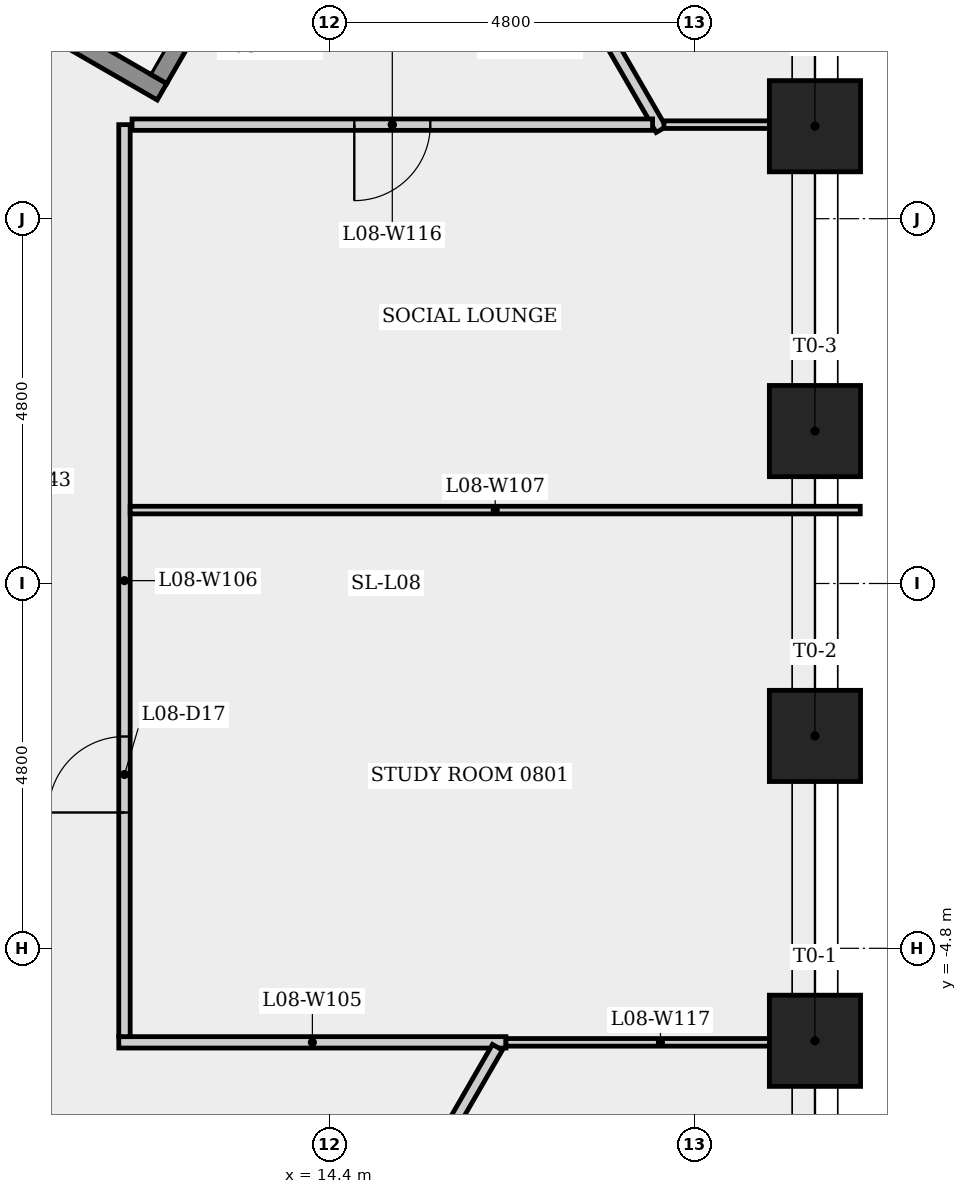
"""IFC4 building model, lengths in metres.
Left out: names, types, materials, properties, quantities, classifications, styles, units other than length and angle.
Written with IfcOpenShell. Run it as: python <this file> out.ifc"""

import sys

from ifc_helpers import new_model, si_unit, direction, frame, frame_2d, origin, origin_2d, place, context, subcontext, project, spatial, rectangle, extrude, element, fill, save


model = new_model("IFC4")
c1 = context("Model", 3, precision=1e-05, world=origin(), true_north=direction((0.0, 1.0)))
c2 = subcontext(c1, "Body", "Model", "MODEL_VIEW")
j1 = project(units=[si_unit("LENGTHUNIT", "METRE"), si_unit("PLANEANGLEUNIT", "RADIAN")], contexts=[c1])
p1 = place(None, origin())
s1 = spatial("IfcSite", under=j1, at=p1, CompositionType="ELEMENT")
p2 = place(p1, origin())
s2 = spatial("IfcBuilding", under=s1, at=p2, CompositionType="ELEMENT")
p3 = place(p2, frame((0.0, 0.0, 35.7)))
s3 = spatial("IfcBuildingStorey", under=s2, at=p3, CompositionType="ELEMENT", Elevation=35.7)
for number, where, z_axis, x_axis in (
    (1, (20.785, -6.017, 0.0), (0.0, 0.0, 1.0), (1.0, 0.0, 0.0)),
    (2, (20.785, -2.006, 0.0), (0.0, 0.0, 1.0), (1.0, 0.0, 0.0)),
    (3, (20.785, 2.006, 0.0), (0.0, 0.0, 1.0), (1.0, 0.0, 0.0)),
    (4, (20.785, 6.017, 0.0), (0.0, 0.0, 1.0), (1.0, 0.0, 0.0)),
):
    element("IfcColumn", number, at=place(p3, frame(where, z_axis=z_axis, x_axis=x_axis)), inside=s3, PredefinedType="COLUMN", context=c2, shape_type="SweptSolid", body=[
        extrude(rectangle(XDim=1.2, YDim=1.2, at=origin_2d()), origin(), (0.0, 0.0, 1.0), 3.4),
    ])
p4 = place(p3, frame((11.625, -6.037, 0.0), z_axis=(0.0, 0.0, 1.0), x_axis=(1.0, 0.0, 0.0)))
e5 = element("IfcWall", 5, at=p4, inside=s3, PredefinedType="PARTITIONING", context=c2, shape_type="SweptSolid", body=[
    extrude(rectangle(XDim=5.094, YDim=0.15, at=frame_2d((2.547, 0.0))), origin(), (0.0, 0.0, 1.0), 3.05),
])
p5 = place(p3, frame((11.7, -5.962, 0.0), z_axis=(0.0, 0.0, 1.0), x_axis=(0.0, 1.0, 0.0)))
e6 = element("IfcWall", 6, at=p5, inside=s3, PredefinedType="PARTITIONING", context=c2, shape_type="SweptSolid", body=[
    extrude(rectangle(XDim=12.0, YDim=0.15, at=frame_2d((6.0, 0.0))), origin(), (0.0, 0.0, 1.0), 3.05),
])
p6 = place(p5, frame((2.949, 0.0, 0.0)))
e7 = element("IfcOpeningElement", 7, at=p6, cuts=e6, PredefinedType="OPENING", context=c2, shape_type="SweptSolid", body=[
    extrude(rectangle(XDim=1.0, YDim=2.1, at=frame_2d((0.5, 1.05))), frame((0.0, 0.085, 0.0), z_axis=(0.0, -1.0, 0.0), x_axis=(1.0, 0.0, 0.0)), (0.0, 0.0, 1.0), 0.17),
])
p7 = place(p3, frame((11.775, 0.966, 0.0), z_axis=(0.0, 0.0, 1.0), x_axis=(1.0, 0.0, 0.0)))
e8 = element("IfcWall", 8, at=p7, inside=s3, PredefinedType="PARTITIONING", context=c2, shape_type="SweptSolid", body=[
    extrude(rectangle(XDim=9.606, YDim=0.1, at=frame_2d((4.803, 0.0))), origin(), (0.0, 0.0, 1.0), 3.05),
])
p8 = place(p3, frame((12.194, 6.47, 0.0), z_axis=(0.0, 0.0, 1.0), x_axis=(-0.866025499775, 0.499999833739, 0.0)))
e9 = element("IfcWall", 9, at=p8, inside=s3, PredefinedType="SHEAR", context=c2, shape_type="SweptSolid", body=[
    extrude(rectangle(XDim=6.4, YDim=0.25, at=frame_2d((3.2, 0.0))), origin(), (0.0, 0.0, 1.0), 3.05),
])
p9 = place(p8, frame((5.25, 0.0, 0.0)))
e10 = element("IfcOpeningElement", 10, at=p9, cuts=e9, PredefinedType="OPENING", context=c2, shape_type="SweptSolid", body=[
    extrude(rectangle(XDim=1.0, YDim=2.1, at=frame_2d((0.5, 1.05))), frame((0.0, 0.135, 0.0), z_axis=(0.0, -1.0, 0.0), x_axis=(1.0, 0.0, 0.0)), (0.0, 0.0, 1.0), 0.27),
])
p10 = place(p3, frame((13.523, 9.022, 0.0), z_axis=(0.0, 0.0, 1.0), x_axis=(-0.500034990121, -0.866005201286, 0.0)))
e11 = element("IfcWall", 11, at=p10, inside=s3, PredefinedType="SHEAR", context=c2, shape_type="SweptSolid", body=[
    extrude(rectangle(XDim=2.75, YDim=0.25, at=frame_2d((1.375, 0.0))), origin(), (0.0, 0.0, 1.0), 3.05),
])
p11 = place(p3, frame((15.299, 11.968, 0.0), z_axis=(0.0, 0.0, 1.0), x_axis=(0.499996158224, -0.866027621823, 0.0)))
e12 = element("IfcWall", 12, at=p11, inside=s3, PredefinedType="PARTITIONING", context=c2, shape_type="SweptSolid", body=[
    extrude(rectangle(XDim=6.923, YDim=0.15, at=frame_2d((3.462, 0.0))), origin(), (0.0, 0.0, 1.0), 3.05),
])
p12 = place(p11, frame((2.907, 0.0, 0.0)))
e13 = element("IfcOpeningElement", 13, at=p12, cuts=e12, PredefinedType="OPENING", context=c2, shape_type="SweptSolid", body=[
    extrude(rectangle(XDim=1.0, YDim=2.1, at=frame_2d((0.5, 1.05))), frame((0.0, 0.085, 0.0), z_axis=(0.0, -1.0, 0.0), x_axis=(1.0, 0.0, 0.0)), (0.0, 0.0, 1.0), 0.17),
])
p13 = place(p3, frame((16.607, -6.102, 0.0), z_axis=(0.0, 0.0, 1.0), x_axis=(-0.499984930112, -0.866034104213, 0.0)))
e14 = element("IfcWall", 14, at=p13, inside=s3, PredefinedType="PARTITIONING", context=c2, shape_type="SweptSolid", body=[
    extrude(rectangle(XDim=8.159, YDim=0.15, at=frame_2d((4.08, 0.0))), origin(), (0.0, 0.0, 1.0), 3.05),
])
p14 = place(p13, frame((3.579, 0.0, 0.0)))
e15 = element("IfcOpeningElement", 15, at=p14, cuts=e14, PredefinedType="OPENING", context=c2, shape_type="SweptSolid", body=[
    extrude(rectangle(XDim=1.0, YDim=2.1, at=frame_2d((0.5, 1.05))), frame((0.0, 0.085, 0.0), z_axis=(0.0, -1.0, 0.0), x_axis=(1.0, 0.0, 0.0)), (0.0, 0.0, 1.0), 0.17),
])
p15 = place(p3, frame((18.798, 6.037, 0.0), z_axis=(0.0, 0.0, 1.0), x_axis=(1.0, 0.0, 0.0)))
e16 = element("IfcWall", 16, at=p15, inside=s3, PredefinedType="PARTITIONING", context=c2, shape_type="SweptSolid", body=[
    extrude(rectangle(XDim=1.987, YDim=0.1, at=frame_2d((0.994, 0.0))), origin(), (0.0, 0.0, 1.0), 3.05),
])
p16 = place(p3, frame((18.648, 6.037, 0.0), z_axis=(0.0, 0.0, 1.0), x_axis=(-1.0, 0.0, 0.0)))
e17 = element("IfcWall", 17, at=p16, inside=s3, PredefinedType="PARTITIONING", context=c2, shape_type="SweptSolid", body=[
    extrude(rectangle(XDim=6.848, YDim=0.15, at=frame_2d((3.424, 0.0))), origin(), (0.0, 0.0, 1.0), 3.05),
])
p17 = place(p16, frame((2.924, 0.0, 0.0)))
e18 = element("IfcOpeningElement", 18, at=p17, cuts=e17, PredefinedType="OPENING", context=c2, shape_type="SweptSolid", body=[
    extrude(rectangle(XDim=1.0, YDim=2.1, at=frame_2d((0.5, 1.05))), frame((0.0, 0.085, 0.0), z_axis=(0.0, -1.0, 0.0), x_axis=(1.0, 0.0, 0.0)), (0.0, 0.0, 1.0), 0.17),
])
p18 = place(p3, frame((20.785, -6.037, 0.0), z_axis=(0.0, 0.0, 1.0), x_axis=(-1.0, 0.0, 0.0)))
e19 = element("IfcWall", 19, at=p18, inside=s3, PredefinedType="PARTITIONING", context=c2, shape_type="SweptSolid", body=[
    extrude(rectangle(XDim=4.065, YDim=0.1, at=frame_2d((2.033, 0.0))), origin(), (0.0, 0.0, 1.0), 3.05),
])
p19 = place(p6, origin())
e20 = element("IfcDoor", 20, at=p19, inside=s3, OperationType="SINGLE_SWING_LEFT", PredefinedType="DOOR", context=c2, shape_type="SweptSolid", body=[
    extrude(rectangle(XDim=1.0, YDim=2.1, at=frame_2d((0.5, 1.05))), frame((0.0, 0.025, 0.0), z_axis=(0.0, -1.0, 0.0), x_axis=(1.0, 0.0, 0.0)), (0.0, 0.0, 1.0), 0.05),
])
fill(e7, e20)
p20 = place(p17, origin())
e21 = element("IfcDoor", 21, at=p20, inside=s3, OperationType="SINGLE_SWING_RIGHT", PredefinedType="DOOR", context=c2, shape_type="SweptSolid", body=[
    extrude(rectangle(XDim=1.0, YDim=2.1, at=frame_2d((0.5, 1.05))), frame((0.0, 0.025, 0.0), z_axis=(0.0, -1.0, 0.0), x_axis=(1.0, 0.0, 0.0)), (0.0, 0.0, 1.0), 0.05),
])
fill(e18, e21)
save(model, sys.argv[1])
